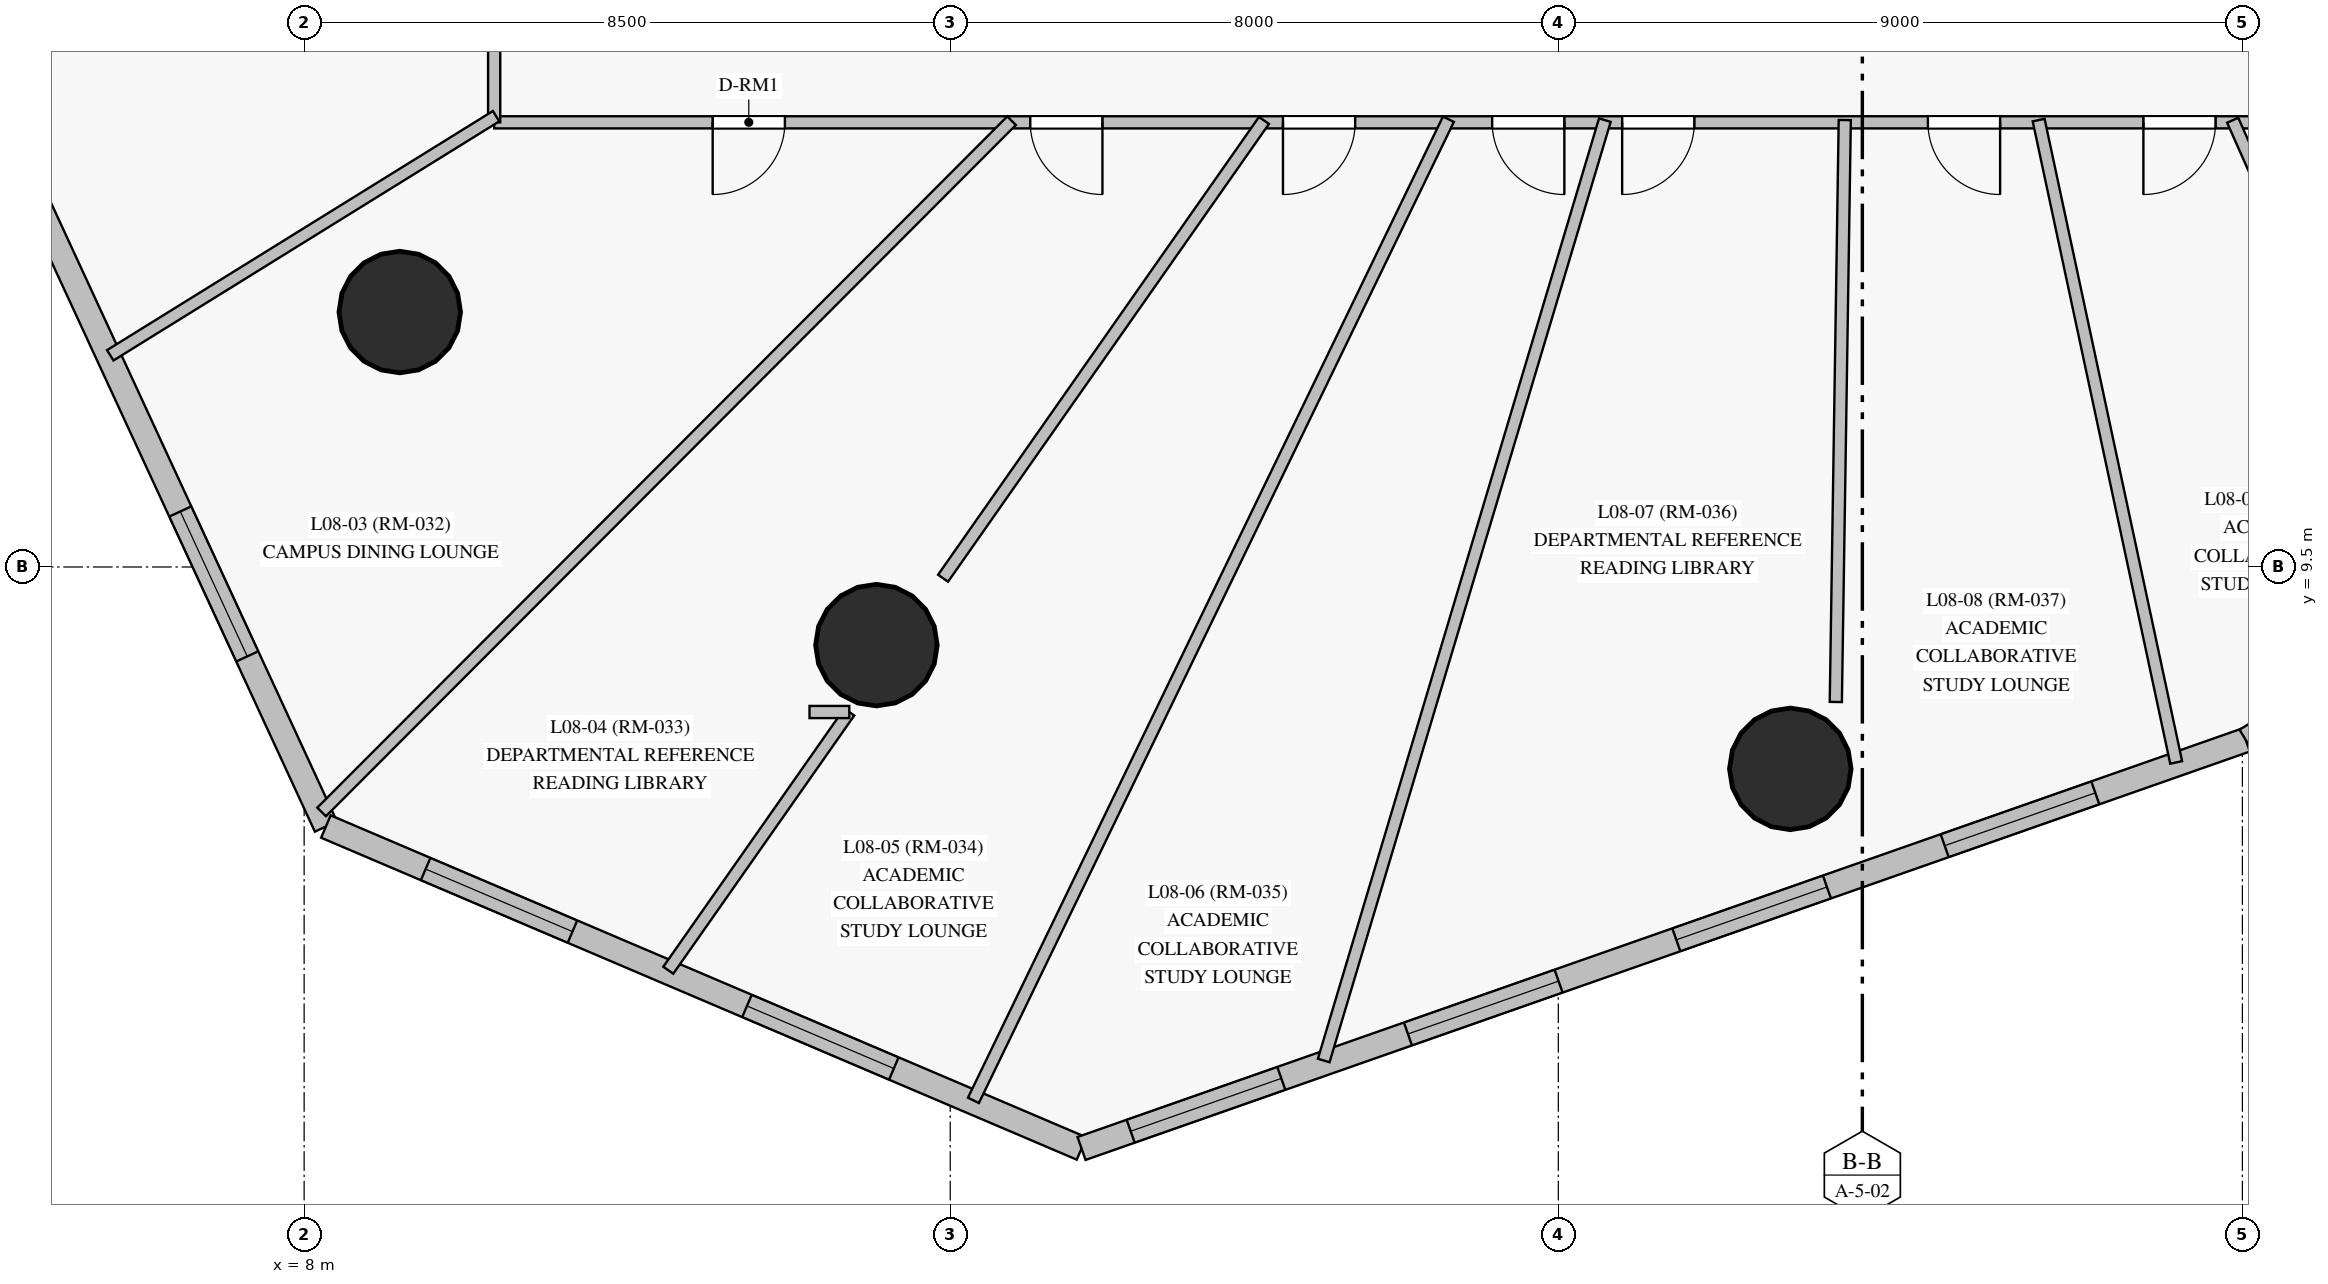
"""IFC4 building model, lengths in metres.
Left out: names, types, materials, properties, quantities, classifications, styles, units other than length and angle.
Written with IfcOpenShell. Run it as: python <this file> out.ifc"""

import sys

from ifc_helpers import new_model, si_unit, direction, frame, frame_2d, origin, origin_with_axes, origin_2d, place, context, subcontext, project, spatial, rectangle, circle, extrude, source, transform, mapped, element, fill, save


model = new_model("IFC4")
c1 = context("Model", 3, precision=1e-05, world=origin(), true_north=direction((0.0, 1.0)))
c2 = subcontext(c1, "Body", "Model", "MODEL_VIEW")
j1 = project(units=[si_unit("LENGTHUNIT", "METRE"), si_unit("PLANEANGLEUNIT", "RADIAN")], contexts=[c1])
p1 = place(None, origin())
s1 = spatial("IfcSite", under=j1, at=p1, CompositionType="ELEMENT")
p2 = place(p1, origin())
s2 = spatial("IfcBuilding", under=s1, at=p2, CompositionType="ELEMENT")
p3 = place(p2, frame((0.0, 0.0, 33.7)))
s3 = spatial("IfcBuildingStorey", under=s2, at=p3, CompositionType="ELEMENT", Elevation=33.7)
m1 = source(origin_with_axes(), c2, "Body", "SweptSolid", [
    extrude(circle(Radius=0.8, at=origin_2d()), origin(), (0.0, 0.0, 1.0), 3.6),
])
for number, where, z_axis, x_axis in (
    (1, (9.258, 12.854, 0.0), (0.0, 0.0, 1.0), (1.0, 0.0, 0.0)),
    (2, (15.529, 8.472, 0.0), (0.0, 0.0, 1.0), (1.0, 0.0, 0.0)),
    (3, (27.552, 6.844, 0.0), (0.0, 0.0, 1.0), (1.0, 0.0, 0.0)),
):
    element("IfcColumn", number, at=place(p3, frame(where, z_axis=z_axis, x_axis=x_axis)), inside=s3, PredefinedType="COLUMN", context=c2, shape_type="MappedRepresentation", body=[
        mapped(m1, transform((0.0, 0.0, 0.0), scale=1.0)),
    ])
p4 = place(p3, frame((2.646, 18.29, 0.0), z_axis=(0.0, 0.0, 1.0), x_axis=(0.419547504899, -0.907733381083, 0.0)))
e4 = element("IfcWall", 4, at=p4, inside=s3, PredefinedType="SOLIDWALL", context=c2, shape_type="SweptSolid", body=[
    extrude(rectangle(XDim=13.445, YDim=0.32, at=frame_2d((6.723, 0.0))), origin(), (0.0, 0.0, 1.0), 3.35),
])
p5 = place(p4, frame((2.292, 0.0, 0.85)))
e5 = element("IfcOpeningElement", 5, at=p5, cuts=e4, PredefinedType="OPENING", context=c2, shape_type="SweptSolid", body=[
    extrude(rectangle(XDim=2.1, YDim=1.95, at=frame_2d((1.05, 0.975))), frame((0.0, 0.17, 0.0), z_axis=(0.0, -1.0, 0.0), x_axis=(1.0, 0.0, 0.0)), (0.0, 0.0, 1.0), 0.34),
])
p6 = place(p4, frame((8.879, 0.0, 0.85)))
e6 = element("IfcOpeningElement", 6, at=p6, cuts=e4, PredefinedType="OPENING", context=c2, shape_type="SweptSolid", body=[
    extrude(rectangle(XDim=2.1, YDim=1.95, at=frame_2d((1.05, 0.975))), frame((0.0, 0.17, 0.0), z_axis=(0.0, -1.0, 0.0), x_axis=(1.0, 0.0, 0.0)), (0.0, 0.0, 1.0), 0.34),
])
p7 = place(p3, frame((8.286, 6.085, 0.0), z_axis=(0.0, 0.0, 1.0), x_axis=(0.91999365671, -0.391933248924, 0.0)))
e7 = element("IfcWall", 7, at=p7, inside=s3, PredefinedType="SOLIDWALL", context=c2, shape_type="SweptSolid", body=[
    extrude(rectangle(XDim=10.806, YDim=0.32, at=frame_2d((5.403, 0.0))), origin(), (0.0, 0.0, 1.0), 3.35),
])
p8 = place(p7, frame((1.426, 0.0, 0.85)))
e8 = element("IfcOpeningElement", 8, at=p8, cuts=e7, PredefinedType="OPENING", context=c2, shape_type="SweptSolid", body=[
    extrude(rectangle(XDim=2.1, YDim=1.95, at=frame_2d((1.05, 0.975))), frame((0.0, 0.17, 0.0), z_axis=(0.0, -1.0, 0.0), x_axis=(1.0, 0.0, 0.0)), (0.0, 0.0, 1.0), 0.34),
])
p9 = place(p7, frame((6.021, 0.0, 0.85)))
e9 = element("IfcOpeningElement", 9, at=p9, cuts=e7, PredefinedType="OPENING", context=c2, shape_type="SweptSolid", body=[
    extrude(rectangle(XDim=2.1, YDim=1.95, at=frame_2d((1.05, 0.975))), frame((0.0, 0.17, 0.0), z_axis=(0.0, -1.0, 0.0), x_axis=(1.0, 0.0, 0.0)), (0.0, 0.0, 1.0), 0.34),
])
p10 = place(p3, frame((18.228, 1.85, 0.0), z_axis=(0.0, 0.0, 1.0), x_axis=(0.943633034102, 0.330993499864, 0.0)))
e10 = element("IfcWall", 10, at=p10, inside=s3, PredefinedType="SOLIDWALL", context=c2, shape_type="SweptSolid", body=[
    extrude(rectangle(XDim=16.232, YDim=0.32, at=frame_2d((8.116, 0.0))), origin(), (0.0, 0.0, 1.0), 3.35),
])
p11 = place(p10, frame((0.685, 0.0, 0.85)))
e11 = element("IfcOpeningElement", 11, at=p11, cuts=e10, PredefinedType="OPENING", context=c2, shape_type="SweptSolid", body=[
    extrude(rectangle(XDim=2.1, YDim=1.95, at=frame_2d((1.05, 0.975))), frame((0.0, 0.17, 0.0), z_axis=(0.0, -1.0, 0.0), x_axis=(1.0, 0.0, 0.0)), (0.0, 0.0, 1.0), 0.34),
])
p12 = place(p10, frame((4.551, 0.0, 0.85)))
e12 = element("IfcOpeningElement", 12, at=p12, cuts=e10, PredefinedType="OPENING", context=c2, shape_type="SweptSolid", body=[
    extrude(rectangle(XDim=2.1, YDim=1.95, at=frame_2d((1.05, 0.975))), frame((0.0, 0.17, 0.0), z_axis=(0.0, -1.0, 0.0), x_axis=(1.0, 0.0, 0.0)), (0.0, 0.0, 1.0), 0.34),
])
p13 = place(p10, frame((8.292, 0.0, 0.85)))
e13 = element("IfcOpeningElement", 13, at=p13, cuts=e10, PredefinedType="OPENING", context=c2, shape_type="SweptSolid", body=[
    extrude(rectangle(XDim=2.1, YDim=1.95, at=frame_2d((1.05, 0.975))), frame((0.0, 0.17, 0.0), z_axis=(0.0, -1.0, 0.0), x_axis=(1.0, 0.0, 0.0)), (0.0, 0.0, 1.0), 0.34),
])
p14 = place(p10, frame((12.034, 0.0, 0.85)))
e14 = element("IfcOpeningElement", 14, at=p14, cuts=e10, PredefinedType="OPENING", context=c2, shape_type="SweptSolid", body=[
    extrude(rectangle(XDim=2.1, YDim=1.95, at=frame_2d((1.05, 0.975))), frame((0.0, 0.17, 0.0), z_axis=(0.0, -1.0, 0.0), x_axis=(1.0, 0.0, 0.0)), (0.0, 0.0, 1.0), 0.34),
])
p15 = place(p3, frame((33.545, 7.223, 0.0), z_axis=(0.0, 0.0, 1.0), x_axis=(0.8560794316, 0.51684427712, 0.0)))
e15 = element("IfcWall", 15, at=p15, inside=s3, PredefinedType="SOLIDWALL", context=c2, shape_type="SweptSolid", body=[
    extrude(rectangle(XDim=11.288, YDim=0.32, at=frame_2d((5.644, 0.0))), origin(), (0.0, 0.0, 1.0), 3.35),
])
p16 = place(p15, frame((0.572, 0.0, 0.85)))
e16 = element("IfcOpeningElement", 16, at=p16, cuts=e15, PredefinedType="OPENING", context=c2, shape_type="SweptSolid", body=[
    extrude(rectangle(XDim=2.1, YDim=1.95, at=frame_2d((1.05, 0.975))), frame((0.0, 0.17, 0.0), z_axis=(0.0, -1.0, 0.0), x_axis=(1.0, 0.0, 0.0)), (0.0, 0.0, 1.0), 0.34),
])
p17 = place(p15, frame((4.305, 0.0, 0.85)))
e17 = element("IfcOpeningElement", 17, at=p17, cuts=e15, PredefinedType="OPENING", context=c2, shape_type="SweptSolid", body=[
    extrude(rectangle(XDim=2.1, YDim=1.95, at=frame_2d((1.05, 0.975))), frame((0.0, 0.17, 0.0), z_axis=(0.0, -1.0, 0.0), x_axis=(1.0, 0.0, 0.0)), (0.0, 0.0, 1.0), 0.34),
])
p18 = place(p15, frame((8.007, 0.0, 0.85)))
e18 = element("IfcOpeningElement", 18, at=p18, cuts=e15, PredefinedType="OPENING", context=c2, shape_type="SweptSolid", body=[
    extrude(rectangle(XDim=2.1, YDim=1.95, at=frame_2d((1.05, 0.975))), frame((0.0, 0.17, 0.0), z_axis=(0.0, -1.0, 0.0), x_axis=(1.0, 0.0, 0.0)), (0.0, 0.0, 1.0), 0.34),
])
p19 = place(p3, frame((40.25, 15.35, 0.0), z_axis=(0.0, 0.0, 1.0), x_axis=(-1.0, 0.0, 0.0)))
e19 = element("IfcWall", 19, at=p19, inside=s3, PredefinedType="PARTITIONING", context=c2, shape_type="SweptSolid", body=[
    extrude(rectangle(XDim=29.75, YDim=0.16, at=frame_2d((14.875, 0.0))), origin(), (0.0, 0.0, 1.0), 2.7),
])
p20 = place(p19, frame((25.925, 0.0, 0.0)))
e20 = element("IfcOpeningElement", 20, at=p20, cuts=e19, PredefinedType="OPENING", context=c2, shape_type="SweptSolid", body=[
    extrude(rectangle(XDim=0.95, YDim=2.15, at=frame_2d((0.475, 1.075))), frame((0.0, 0.09, 0.0), z_axis=(0.0, -1.0, 0.0), x_axis=(1.0, 0.0, 0.0)), (0.0, 0.0, 1.0), 0.18),
])
p21 = place(p19, frame((21.748, 0.0, 0.0)))
e21 = element("IfcOpeningElement", 21, at=p21, cuts=e19, PredefinedType="OPENING", context=c2, shape_type="SweptSolid", body=[
    extrude(rectangle(XDim=0.95, YDim=2.15, at=frame_2d((0.475, 1.075))), frame((0.0, 0.09, 0.0), z_axis=(0.0, -1.0, 0.0), x_axis=(1.0, 0.0, 0.0)), (0.0, 0.0, 1.0), 0.18),
])
p22 = place(p19, frame((18.423, 0.0, 0.0)))
e22 = element("IfcOpeningElement", 22, at=p22, cuts=e19, PredefinedType="OPENING", context=c2, shape_type="SweptSolid", body=[
    extrude(rectangle(XDim=0.95, YDim=2.15, at=frame_2d((0.475, 1.075))), frame((0.0, 0.09, 0.0), z_axis=(0.0, -1.0, 0.0), x_axis=(1.0, 0.0, 0.0)), (0.0, 0.0, 1.0), 0.18),
])
p23 = place(p19, frame((15.67, 0.0, 0.0)))
e23 = element("IfcOpeningElement", 23, at=p23, cuts=e19, PredefinedType="OPENING", context=c2, shape_type="SweptSolid", body=[
    extrude(rectangle(XDim=0.95, YDim=2.15, at=frame_2d((0.475, 1.075))), frame((0.0, 0.09, 0.0), z_axis=(0.0, -1.0, 0.0), x_axis=(1.0, 0.0, 0.0)), (0.0, 0.0, 1.0), 0.18),
])
p24 = place(p19, frame((13.96, 0.0, 0.0)))
e24 = element("IfcOpeningElement", 24, at=p24, cuts=e19, PredefinedType="OPENING", context=c2, shape_type="SweptSolid", body=[
    extrude(rectangle(XDim=0.95, YDim=2.15, at=frame_2d((0.475, 1.075))), frame((0.0, 0.09, 0.0), z_axis=(0.0, -1.0, 0.0), x_axis=(1.0, 0.0, 0.0)), (0.0, 0.0, 1.0), 0.18),
])
p25 = place(p19, frame((9.938, 0.0, 0.0)))
e25 = element("IfcOpeningElement", 25, at=p25, cuts=e19, PredefinedType="OPENING", context=c2, shape_type="SweptSolid", body=[
    extrude(rectangle(XDim=0.95, YDim=2.15, at=frame_2d((0.475, 1.075))), frame((0.0, 0.09, 0.0), z_axis=(0.0, -1.0, 0.0), x_axis=(1.0, 0.0, 0.0)), (0.0, 0.0, 1.0), 0.18),
])
p26 = place(p19, frame((7.103, 0.0, 0.0)))
e26 = element("IfcOpeningElement", 26, at=p26, cuts=e19, PredefinedType="OPENING", context=c2, shape_type="SweptSolid", body=[
    extrude(rectangle(XDim=0.95, YDim=2.15, at=frame_2d((0.475, 1.075))), frame((0.0, 0.09, 0.0), z_axis=(0.0, -1.0, 0.0), x_axis=(1.0, 0.0, 0.0)), (0.0, 0.0, 1.0), 0.18),
])
p27 = place(p3, frame((10.5, 15.35, 0.0), z_axis=(0.0, 0.0, 1.0), x_axis=(0.0, 1.0, 0.0)))
e27 = element("IfcWall", 27, at=p27, inside=s3, PredefinedType="PARTITIONING", context=c2, shape_type="SweptSolid", body=[
    extrude(rectangle(XDim=22.3, YDim=0.16, at=frame_2d((11.15, 0.0))), origin(), (0.0, 0.0, 1.0), 2.75),
])
p28 = place(p27, frame((10.675, 0.0, 0.0)))
e28 = element("IfcOpeningElement", 28, at=p28, cuts=e27, PredefinedType="OPENING", context=c2, shape_type="SweptSolid", body=[
    extrude(rectangle(XDim=0.95, YDim=2.15, at=frame_2d((0.475, 1.075))), frame((0.0, 0.09, 0.0), z_axis=(0.0, -1.0, 0.0), x_axis=(1.0, 0.0, 0.0)), (0.0, 0.0, 1.0), 0.18),
])
p29 = place(p27, frame((4.56, 0.0, 0.0)))
e29 = element("IfcOpeningElement", 29, at=p29, cuts=e27, PredefinedType="OPENING", context=c2, shape_type="SweptSolid", body=[
    extrude(rectangle(XDim=0.96, YDim=2.15, at=frame_2d((0.48, 1.075))), frame((0.0, 0.09, 0.0), z_axis=(0.0, -1.0, 0.0), x_axis=(1.0, 0.0, 0.0)), (0.0, 0.0, 1.0), 0.18),
])
p30 = place(p27, frame((14.02, 0.0, 0.0)))
e30 = element("IfcOpeningElement", 30, at=p30, cuts=e27, PredefinedType="OPENING", context=c2, shape_type="SweptSolid", body=[
    extrude(rectangle(XDim=0.95, YDim=2.15, at=frame_2d((0.475, 1.075))), frame((0.0, 0.09, 0.0), z_axis=(0.0, -1.0, 0.0), x_axis=(1.0, 0.0, 0.0)), (0.0, 0.0, 1.0), 0.18),
])
p31 = place(p3, frame((23.054, 15.39, 0.0), z_axis=(0.0, 0.0, 1.0), x_axis=(-0.435763835204, -0.900061042334, 0.0)))
e31 = element("IfcWall", 31, at=p31, inside=s3, PredefinedType="PARTITIONING", context=c2, shape_type="SweptSolid", body=[
    extrude(rectangle(XDim=14.34, YDim=0.16, at=frame_2d((7.17, 0.0))), origin(), (0.0, 0.0, 1.0), 3.35),
])
p32 = place(p3, frame((25.113, 15.379, 0.0), z_axis=(0.0, 0.0, 1.0), x_axis=(-0.286447487673, -0.958095943424, 0.0)))
e32 = element("IfcWall", 32, at=p32, inside=s3, PredefinedType="PARTITIONING", context=c2, shape_type="SweptSolid", body=[
    extrude(rectangle(XDim=12.912, YDim=0.16, at=frame_2d((6.456, 0.0))), origin(), (0.0, 0.0, 1.0), 3.35),
])
p33 = place(p3, frame((17.307, 15.371, 0.0), z_axis=(0.0, 0.0, 1.0), x_axis=(-0.706450948612, -0.707762006048, 0.0)))
e33 = element("IfcWall", 33, at=p33, inside=s3, PredefinedType="PARTITIONING", context=c2, shape_type="SweptSolid", body=[
    extrude(rectangle(XDim=12.849, YDim=0.16, at=frame_2d((6.424, 0.0))), origin(), (0.0, 0.0, 1.0), 3.35),
])
p34 = place(p3, frame((30.82, 15.379, 0.0), z_axis=(0.0, 0.0, 1.0), x_axis=(0.20933229931, -0.977844562528, 0.0)))
e34 = element("IfcWall", 34, at=p34, inside=s3, PredefinedType="PARTITIONING", context=c2, shape_type="SweptSolid", body=[
    extrude(rectangle(XDim=8.642, YDim=0.16, at=frame_2d((4.321, 0.0))), origin(), (0.0, 0.0, 1.0), 3.35),
])
p35 = place(p3, frame((28.269, 15.38, 0.0), z_axis=(0.0, 0.0, 1.0), x_axis=(-0.015400941242, -0.999881398471, 0.0)))
e35 = element("IfcWall", 35, at=p35, inside=s3, PredefinedType="PARTITIONING", context=c2, shape_type="SweptSolid", body=[
    extrude(rectangle(XDim=7.657, YDim=0.16, at=frame_2d((3.828, 0.0))), origin(), (0.0, 0.0, 1.0), 3.35),
])
p36 = place(p3, frame((20.628, 15.375, 0.0), z_axis=(0.0, 0.0, 1.0), x_axis=(-0.574028069181, -0.818835621961, 0.0)))
e36 = element("IfcWall", 36, at=p36, inside=s3, PredefinedType="PARTITIONING", context=c2, shape_type="SweptSolid", body=[
    extrude(rectangle(XDim=7.355, YDim=0.16, at=frame_2d((3.677, 0.0))), origin(), (0.0, 0.0, 1.0), 2.7),
])
p37 = place(p3, frame((33.373, 15.377, 0.0), z_axis=(0.0, 0.0, 1.0), x_axis=(0.40578429947, -0.913968873816, 0.0)))
e37 = element("IfcWall", 37, at=p37, inside=s3, PredefinedType="PARTITIONING", context=c2, shape_type="SweptSolid", body=[
    extrude(rectangle(XDim=7.1, YDim=0.16, at=frame_2d((3.55, 0.0))), origin(), (0.0, 0.0, 1.0), 3.35),
])
p38 = place(p3, frame((10.525, 15.431, 0.0), z_axis=(0.0, 0.0, 1.0), x_axis=(-0.849994952972, -0.526790831281, 0.0)))
e38 = element("IfcWall", 38, at=p38, inside=s3, PredefinedType="PARTITIONING", context=c2, shape_type="SweptSolid", body=[
    extrude(rectangle(XDim=5.972, YDim=0.16, at=frame_2d((2.986, 0.0))), origin(), (0.0, 0.0, 1.0), 3.35),
])
p39 = place(p3, frame((15.172, 7.592, 0.0), z_axis=(0.0, 0.0, 1.0), x_axis=(-0.573995402066, -0.818858521606, 0.0)))
e39 = element("IfcWall", 39, at=p39, inside=s3, PredefinedType="PARTITIONING", context=c2, shape_type="SweptSolid", body=[
    extrude(rectangle(XDim=4.149, YDim=0.16, at=frame_2d((2.074, 0.0))), origin(), (0.0, 0.0, 1.0), 3.35),
])
p40 = place(p3, frame((14.649, 7.592, 0.0), z_axis=(0.0, 0.0, 1.0), x_axis=(1.0, 0.0, 0.0)))
e40 = element("IfcWall", 40, at=p40, inside=s3, PredefinedType="PARTITIONING", context=c2, shape_type="SweptSolid", body=[
    extrude(rectangle(XDim=0.523, YDim=0.16, at=frame_2d((0.262, 0.0))), origin(), (0.0, 0.0, 1.0), 3.35),
])
m2 = source(origin_with_axes(), c2, "Body", "SweptSolid", [
    extrude(rectangle(XDim=2.1, YDim=1.95, at=frame_2d((1.05, 0.975))), frame((0.0, 0.03, 0.0), z_axis=(0.0, -1.0, 0.0), x_axis=(1.0, 0.0, 0.0)), (0.0, 0.0, 1.0), 0.06),
])
p41 = place(p6, origin())
e41 = element("IfcWindow", 41, at=p41, inside=s3, PartitioningType="SINGLE_PANEL", PredefinedType="WINDOW", context=c2, shape_type="MappedRepresentation", body=[
    mapped(m2, transform((0.0, 0.0, 0.0), scale=1.0)),
])
fill(e6, e41)
p42 = place(p8, origin())
e42 = element("IfcWindow", 42, at=p42, inside=s3, PartitioningType="SINGLE_PANEL", PredefinedType="WINDOW", context=c2, shape_type="MappedRepresentation", body=[
    mapped(m2, transform((0.0, 0.0, 0.0), scale=1.0)),
])
fill(e8, e42)
p43 = place(p9, origin())
e43 = element("IfcWindow", 43, at=p43, inside=s3, PartitioningType="SINGLE_PANEL", PredefinedType="WINDOW", context=c2, shape_type="MappedRepresentation", body=[
    mapped(m2, transform((0.0, 0.0, 0.0), scale=1.0)),
])
fill(e9, e43)
p44 = place(p11, origin())
e44 = element("IfcWindow", 44, at=p44, inside=s3, PartitioningType="SINGLE_PANEL", PredefinedType="WINDOW", context=c2, shape_type="MappedRepresentation", body=[
    mapped(m2, transform((0.0, 0.0, 0.0), scale=1.0)),
])
fill(e11, e44)
p45 = place(p12, origin())
e45 = element("IfcWindow", 45, at=p45, inside=s3, PartitioningType="SINGLE_PANEL", PredefinedType="WINDOW", context=c2, shape_type="MappedRepresentation", body=[
    mapped(m2, transform((0.0, 0.0, 0.0), scale=1.0)),
])
fill(e12, e45)
p46 = place(p13, origin())
e46 = element("IfcWindow", 46, at=p46, inside=s3, PartitioningType="SINGLE_PANEL", PredefinedType="WINDOW", context=c2, shape_type="MappedRepresentation", body=[
    mapped(m2, transform((0.0, 0.0, 0.0), scale=1.0)),
])
fill(e13, e46)
p47 = place(p14, origin())
e47 = element("IfcWindow", 47, at=p47, inside=s3, PartitioningType="SINGLE_PANEL", PredefinedType="WINDOW", context=c2, shape_type="MappedRepresentation", body=[
    mapped(m2, transform((0.0, 0.0, 0.0), scale=1.0)),
])
fill(e14, e47)
m3 = source(origin_with_axes(), c2, "Body", "SweptSolid", [
    extrude(rectangle(XDim=0.95, YDim=2.15, at=frame_2d((0.475, 1.075))), frame((0.0, 0.025, 0.0), z_axis=(0.0, -1.0, 0.0), x_axis=(1.0, 0.0, 0.0)), (0.0, 0.0, 1.0), 0.05),
])
p48 = place(p20, origin())
e48 = element("IfcDoor", 48, at=p48, inside=s3, OperationType="SINGLE_SWING_RIGHT", PredefinedType="DOOR", context=c2, shape_type="MappedRepresentation", body=[
    mapped(m3, transform((0.0, 0.0, 0.0), scale=1.0)),
])
fill(e20, e48)
p49 = place(p21, origin())
e49 = element("IfcDoor", 49, at=p49, inside=s3, OperationType="SINGLE_SWING_LEFT", PredefinedType="DOOR", context=c2, shape_type="MappedRepresentation", body=[
    mapped(m3, transform((0.0, 0.0, 0.0), scale=1.0)),
])
fill(e21, e49)
p50 = place(p22, origin())
e50 = element("IfcDoor", 50, at=p50, inside=s3, OperationType="SINGLE_SWING_RIGHT", PredefinedType="DOOR", context=c2, shape_type="MappedRepresentation", body=[
    mapped(m3, transform((0.0, 0.0, 0.0), scale=1.0)),
])
fill(e22, e50)
p51 = place(p23, origin())
e51 = element("IfcDoor", 51, at=p51, inside=s3, OperationType="SINGLE_SWING_LEFT", PredefinedType="DOOR", context=c2, shape_type="MappedRepresentation", body=[
    mapped(m3, transform((0.0, 0.0, 0.0), scale=1.0)),
])
fill(e23, e51)
p52 = place(p24, origin())
e52 = element("IfcDoor", 52, at=p52, inside=s3, OperationType="SINGLE_SWING_RIGHT", PredefinedType="DOOR", context=c2, shape_type="MappedRepresentation", body=[
    mapped(m3, transform((0.0, 0.0, 0.0), scale=1.0)),
])
fill(e24, e52)
p53 = place(p25, origin())
e53 = element("IfcDoor", 53, at=p53, inside=s3, OperationType="SINGLE_SWING_LEFT", PredefinedType="DOOR", context=c2, shape_type="MappedRepresentation", body=[
    mapped(m3, transform((0.0, 0.0, 0.0), scale=1.0)),
])
fill(e25, e53)
p54 = place(p26, origin())
e54 = element("IfcDoor", 54, at=p54, inside=s3, OperationType="SINGLE_SWING_RIGHT", PredefinedType="DOOR", context=c2, shape_type="MappedRepresentation", body=[
    mapped(m3, transform((0.0, 0.0, 0.0), scale=1.0)),
])
fill(e26, e54)
save(model, sys.argv[1])
